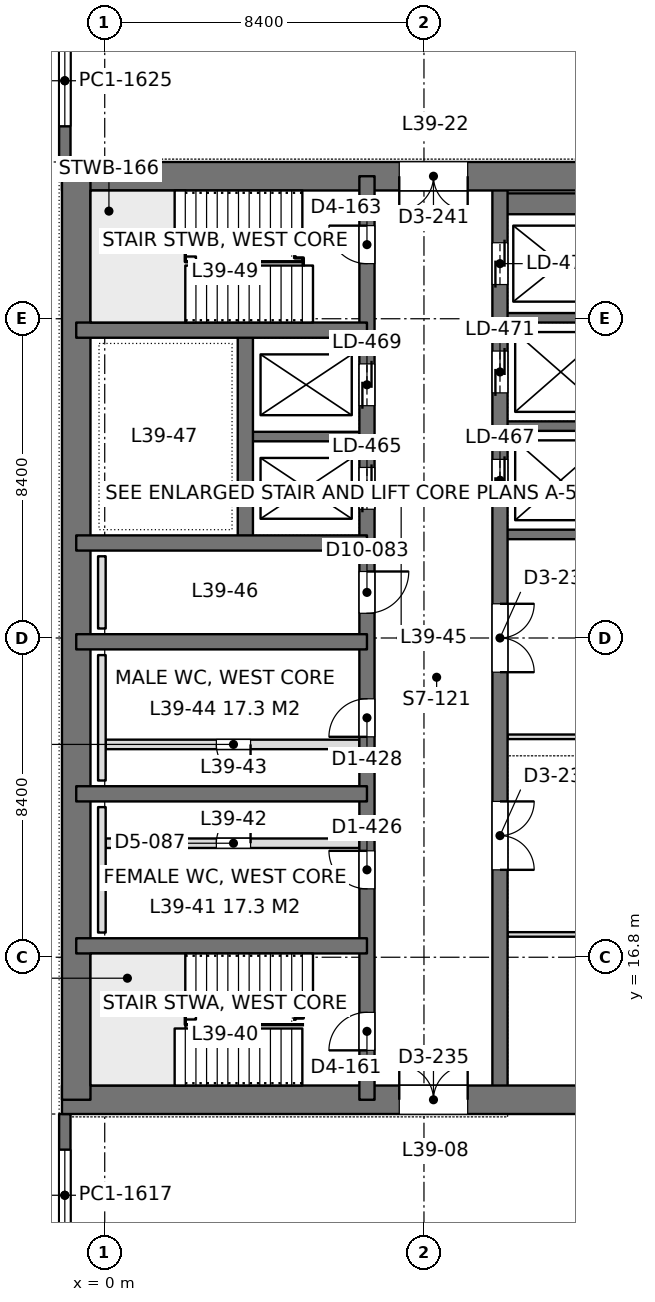
"""IFC4 building model, lengths in metres.
Left out: names, types, materials, properties, quantities, classifications, styles, units other than length and angle.
Written with IfcOpenShell. Run it as: python <this file> out.ifc"""

import sys

from ifc_helpers import new_model, si_unit, direction, frame, frame_2d, origin, place, context, subcontext, project, spatial, rectangle, extrude, element, fill, save


model = new_model("IFC4")
c1 = context("Model", 3, precision=1e-05, world=origin(), true_north=direction((0.0, 1.0)))
c2 = subcontext(c1, "Body", "Model", "MODEL_VIEW")
j1 = project(units=[si_unit("LENGTHUNIT", "METRE"), si_unit("PLANEANGLEUNIT", "RADIAN")], contexts=[c1])
p1 = place(None, origin())
s1 = spatial("IfcSite", under=j1, at=p1, CompositionType="ELEMENT")
p2 = place(p1, origin())
s2 = spatial("IfcBuilding", under=s1, at=p2, CompositionType="ELEMENT")
p3 = place(p2, frame((0.0, 0.0, 173.4)))
s3 = spatial("IfcBuildingStorey", under=s2, at=p3, CompositionType="ELEMENT", Elevation=173.4)
p4 = place(p3, frame((-1.125, 13.05, 0.0), z_axis=(0.0, 0.0, 1.0), x_axis=(1.0, 0.0, 0.0)))
e1 = element("IfcWall", 1, at=p4, inside=s3, PredefinedType="SHEAR", context=c2, shape_type="SweptSolid", body=[
    extrude(rectangle(XDim=17.85, YDim=0.75, at=frame_2d((8.925, 0.0))), origin(), (0.0, 0.0, 1.0), 4.2),
])
p5 = place(p4, frame((8.875, 0.0, 0.0)))
e2 = element("IfcOpeningElement", 2, at=p5, cuts=e1, PredefinedType="OPENING", context=c2, shape_type="SweptSolid", body=[
    extrude(rectangle(XDim=1.8, YDim=2.4, at=frame_2d((0.9, 1.2))), frame((0.0, 0.385, 0.0), z_axis=(0.0, -1.0, 0.0), x_axis=(1.0, 0.0, 0.0)), (0.0, 0.0, 1.0), 0.77),
])
p6 = place(p3, frame((-1.125, 37.35, 0.0), z_axis=(0.0, 0.0, 1.0), x_axis=(1.0, 0.0, 0.0)))
e3 = element("IfcWall", 3, at=p6, inside=s3, PredefinedType="SHEAR", context=c2, shape_type="SweptSolid", body=[
    extrude(rectangle(XDim=17.85, YDim=0.75, at=frame_2d((8.925, 0.0))), origin(), (0.0, 0.0, 1.0), 4.2),
])
p7 = place(p6, frame((8.875, 0.0, 0.0)))
e4 = element("IfcOpeningElement", 4, at=p7, cuts=e3, PredefinedType="OPENING", context=c2, shape_type="SweptSolid", body=[
    extrude(rectangle(XDim=1.8, YDim=2.4, at=frame_2d((0.9, 1.2))), frame((0.0, 0.385, 0.0), z_axis=(0.0, -1.0, 0.0), x_axis=(1.0, 0.0, 0.0)), (0.0, 0.0, 1.0), 0.77),
])
p8 = place(p3, frame((-0.75, 13.05, 0.0), z_axis=(0.0, 0.0, 1.0), x_axis=(0.0, 1.0, 0.0)))
e5 = element("IfcWall", 5, at=p8, inside=s3, PredefinedType="SHEAR", context=c2, shape_type="SweptSolid", body=[
    extrude(rectangle(XDim=24.3, YDim=0.75, at=frame_2d((12.15, 0.0))), origin(), (0.0, 0.0, 1.0), 4.2),
])
p9 = place(p3, frame((6.9, 13.05, 0.0), z_axis=(0.0, 0.0, 1.0), x_axis=(0.0, 1.0, 0.0)))
e6 = element("IfcWall", 6, at=p9, inside=s3, PredefinedType="SHEAR", context=c2, shape_type="SweptSolid", body=[
    extrude(rectangle(XDim=24.3, YDim=0.4, at=frame_2d((12.15, 0.0))), origin(), (0.0, 0.0, 1.0), 4.2),
])
p10 = place(p9, frame((1.3, 0.0, 0.0)))
e7 = element("IfcOpeningElement", 7, at=p10, cuts=e6, PredefinedType="OPENING", context=c2, shape_type="SweptSolid", body=[
    extrude(rectangle(XDim=1.0, YDim=2.2, at=frame_2d((0.5, 1.1))), frame((0.0, 0.21, 0.0), z_axis=(0.0, -1.0, 0.0), x_axis=(1.0, 0.0, 0.0)), (0.0, 0.0, 1.0), 0.42),
])
p11 = place(p9, frame((22.0, 0.0, 0.0)))
e8 = element("IfcOpeningElement", 8, at=p11, cuts=e6, PredefinedType="OPENING", context=c2, shape_type="SweptSolid", body=[
    extrude(rectangle(XDim=1.0, YDim=2.2, at=frame_2d((0.5, 1.1))), frame((0.0, 0.21, 0.0), z_axis=(0.0, -1.0, 0.0), x_axis=(1.0, 0.0, 0.0)), (0.0, 0.0, 1.0), 0.42),
])
p12 = place(p9, frame((5.55, 0.0, 0.0)))
e9 = element("IfcOpeningElement", 9, at=p12, cuts=e6, PredefinedType="OPENING", context=c2, shape_type="SweptSolid", body=[
    extrude(rectangle(XDim=1.0, YDim=2.2, at=frame_2d((0.5, 1.1))), frame((0.0, 0.21, 0.0), z_axis=(0.0, -1.0, 0.0), x_axis=(1.0, 0.0, 0.0)), (0.0, 0.0, 1.0), 0.42),
])
p13 = place(p9, frame((9.55, 0.0, 0.0)))
e10 = element("IfcOpeningElement", 10, at=p13, cuts=e6, PredefinedType="OPENING", context=c2, shape_type="SweptSolid", body=[
    extrude(rectangle(XDim=1.0, YDim=2.2, at=frame_2d((0.5, 1.1))), frame((0.0, 0.21, 0.0), z_axis=(0.0, -1.0, 0.0), x_axis=(1.0, 0.0, 0.0)), (0.0, 0.0, 1.0), 0.42),
])
p14 = place(p9, frame((12.8, 0.0, 0.0)))
e11 = element("IfcOpeningElement", 11, at=p14, cuts=e6, PredefinedType="OPENING", context=c2, shape_type="SweptSolid", body=[
    extrude(rectangle(XDim=1.1, YDim=2.2, at=frame_2d((0.55, 1.1))), frame((0.0, 0.21, 0.0), z_axis=(0.0, -1.0, 0.0), x_axis=(1.0, 0.0, 0.0)), (0.0, 0.0, 1.0), 0.42),
])
p15 = place(p9, frame((15.538, 0.0, 0.0)))
e12 = element("IfcOpeningElement", 12, at=p15, cuts=e6, PredefinedType="OPENING", context=c2, shape_type="SweptSolid", body=[
    extrude(rectangle(XDim=1.1, YDim=2.2, at=frame_2d((0.55, 1.1))), frame((0.0, 0.21, 0.0), z_axis=(0.0, -1.0, 0.0), x_axis=(1.0, 0.0, 0.0)), (0.0, 0.0, 1.0), 0.42),
])
p16 = place(p9, frame((18.262, 0.0, 0.0)))
e13 = element("IfcOpeningElement", 13, at=p16, cuts=e6, PredefinedType="OPENING", context=c2, shape_type="SweptSolid", body=[
    extrude(rectangle(XDim=1.1, YDim=2.2, at=frame_2d((0.55, 1.1))), frame((0.0, 0.21, 0.0), z_axis=(0.0, -1.0, 0.0), x_axis=(1.0, 0.0, 0.0)), (0.0, 0.0, 1.0), 0.42),
])
p17 = place(p3, frame((10.4, 13.05, 0.0), z_axis=(0.0, 0.0, 1.0), x_axis=(0.0, 1.0, 0.0)))
e14 = element("IfcWall", 14, at=p17, inside=s3, PredefinedType="SHEAR", context=c2, shape_type="SweptSolid", body=[
    extrude(rectangle(XDim=24.3, YDim=0.4, at=frame_2d((12.15, 0.0))), origin(), (0.0, 0.0, 1.0), 4.2),
])
p18 = place(p17, frame((15.75, 0.0, 0.0)))
e15 = element("IfcOpeningElement", 15, at=p18, cuts=e14, PredefinedType="OPENING", context=c2, shape_type="SweptSolid", body=[
    extrude(rectangle(XDim=1.1, YDim=2.2, at=frame_2d((0.55, 1.1))), frame((0.0, 0.21, 0.0), z_axis=(0.0, -1.0, 0.0), x_axis=(1.0, 0.0, 0.0)), (0.0, 0.0, 1.0), 0.42),
])
p19 = place(p17, frame((18.6, 0.0, 0.0)))
e16 = element("IfcOpeningElement", 16, at=p19, cuts=e14, PredefinedType="OPENING", context=c2, shape_type="SweptSolid", body=[
    extrude(rectangle(XDim=1.1, YDim=2.2, at=frame_2d((0.55, 1.1))), frame((0.0, 0.21, 0.0), z_axis=(0.0, -1.0, 0.0), x_axis=(1.0, 0.0, 0.0)), (0.0, 0.0, 1.0), 0.42),
])
p20 = place(p17, frame((21.45, 0.0, 0.0)))
e17 = element("IfcOpeningElement", 17, at=p20, cuts=e14, PredefinedType="OPENING", context=c2, shape_type="SweptSolid", body=[
    extrude(rectangle(XDim=1.1, YDim=2.2, at=frame_2d((0.55, 1.1))), frame((0.0, 0.21, 0.0), z_axis=(0.0, -1.0, 0.0), x_axis=(1.0, 0.0, 0.0)), (0.0, 0.0, 1.0), 0.42),
])
p21 = place(p17, frame((6.05, 0.0, 0.0)))
e18 = element("IfcOpeningElement", 18, at=p21, cuts=e14, PredefinedType="OPENING", context=c2, shape_type="SweptSolid", body=[
    extrude(rectangle(XDim=1.8, YDim=2.4, at=frame_2d((0.9, 1.2))), frame((0.0, 0.21, 0.0), z_axis=(0.0, -1.0, 0.0), x_axis=(1.0, 0.0, 0.0)), (0.0, 0.0, 1.0), 0.42),
])
p22 = place(p17, frame((11.25, 0.0, 0.0)))
e19 = element("IfcOpeningElement", 19, at=p22, cuts=e14, PredefinedType="OPENING", context=c2, shape_type="SweptSolid", body=[
    extrude(rectangle(XDim=1.8, YDim=2.4, at=frame_2d((0.9, 1.2))), frame((0.0, 0.21, 0.0), z_axis=(0.0, -1.0, 0.0), x_axis=(1.0, 0.0, 0.0)), (0.0, 0.0, 1.0), 0.42),
])
for number, where, z_axis, x_axis in (
    (20, (-0.75, 17.1, 0.0), (0.0, 0.0, 1.0), (1.0, 0.0, 0.0)),
    (21, (-0.75, 21.1, 0.0), (0.0, 0.0, 1.0), (1.0, 0.0, 0.0)),
    (22, (-0.75, 25.1, 0.0), (0.0, 0.0, 1.0), (1.0, 0.0, 0.0)),
    (23, (-0.75, 27.7, 0.0), (0.0, 0.0, 1.0), (1.0, 0.0, 0.0)),
    (24, (-0.75, 33.3, 0.0), (0.0, 0.0, 1.0), (1.0, 0.0, 0.0)),
):
    element("IfcWall", number, at=place(p3, frame(where, z_axis=z_axis, x_axis=x_axis)), inside=s3, PredefinedType="SHEAR", context=c2, shape_type="SweptSolid", body=[
        extrude(rectangle(XDim=7.65, YDim=0.4, at=frame_2d((3.825, 0.0))), origin(), (0.0, 0.0, 1.0), 4.2),
    ])
p23 = place(p3, frame((3.7, 27.7, 0.0), z_axis=(0.0, 0.0, 1.0), x_axis=(0.0, 1.0, 0.0)))
e25 = element("IfcWall", 25, at=p23, inside=s3, PredefinedType="SHEAR", context=c2, shape_type="SweptSolid", body=[
    extrude(rectangle(XDim=5.6, YDim=0.4, at=frame_2d((2.8, 0.0))), origin(), (0.0, 0.0, 1.0), 4.2),
])
p24 = place(p3, frame((3.7, 30.5, 0.0), z_axis=(0.0, 0.0, 1.0), x_axis=(1.0, 0.0, 0.0)))
e26 = element("IfcWall", 26, at=p24, inside=s3, PredefinedType="SHEAR", context=c2, shape_type="SweptSolid", body=[
    extrude(rectangle(XDim=3.2, YDim=0.25, at=frame_2d((1.6, 0.0))), origin(), (0.0, 0.0, 1.0), 4.2),
])
p25 = place(p3, frame((10.4, 27.925, 0.0), z_axis=(0.0, 0.0, 1.0), x_axis=(1.0, 0.0, 0.0)))
e27 = element("IfcWall", 27, at=p25, inside=s3, PredefinedType="SHEAR", context=c2, shape_type="SweptSolid", body=[
    extrude(rectangle(XDim=5.95, YDim=0.25, at=frame_2d((2.975, 0.0))), origin(), (0.0, 0.0, 1.0), 4.2),
])
for number, where, z_axis, x_axis in (
    (28, (10.4, 30.775, 0.0), (0.0, 0.0, 1.0), (1.0, 0.0, 0.0)),
    (29, (10.4, 33.625, 0.0), (0.0, 0.0, 1.0), (1.0, 0.0, 0.0)),
):
    element("IfcWall", number, at=place(p3, frame(where, z_axis=z_axis, x_axis=x_axis)), inside=s3, PredefinedType="SHEAR", context=c2, shape_type="SweptSolid", body=[
        extrude(rectangle(XDim=3.2, YDim=0.25, at=frame_2d((1.6, 0.0))), origin(), (0.0, 0.0, 1.0), 4.2),
    ])
p26 = place(p3, frame((10.4, 36.625, 0.0), z_axis=(0.0, 0.0, 1.0), x_axis=(1.0, 0.0, 0.0)))
e30 = element("IfcWall", 30, at=p26, inside=s3, PredefinedType="SHEAR", context=c2, shape_type="SweptSolid", body=[
    extrude(rectangle(XDim=3.2, YDim=0.55, at=frame_2d((1.6, 0.0))), origin(), (0.0, 0.0, 1.0), 4.2),
])
p27 = place(p3, frame((-1.05, 8.4, 0.0), z_axis=(0.0, 0.0, 1.0), x_axis=(0.0, 1.0, 0.0)))
e31 = element("IfcWall", 31, at=p27, inside=s3, PredefinedType="SOLIDWALL", context=c2, shape_type="SweptSolid", body=[
    extrude(rectangle(XDim=4.275, YDim=0.3, at=frame_2d((2.138, 0.0))), origin(), (0.0, 0.0, 1.0), 4.05),
])
p28 = place(p27, frame((0.938, 0.0, 0.9)))
e32 = element("IfcOpeningElement", 32, at=p28, cuts=e31, PredefinedType="OPENING", context=c2, shape_type="SweptSolid", body=[
    extrude(rectangle(XDim=2.4, YDim=1.9, at=frame_2d((1.2, 0.95))), frame((0.0, 0.16, 0.0), z_axis=(0.0, -1.0, 0.0), x_axis=(1.0, 0.0, 0.0)), (0.0, 0.0, 1.0), 0.32),
])
p29 = place(p3, frame((-1.05, 37.725, 0.0), z_axis=(0.0, 0.0, 1.0), x_axis=(0.0, 1.0, 0.0)))
e33 = element("IfcWall", 33, at=p29, inside=s3, PredefinedType="SOLIDWALL", context=c2, shape_type="SweptSolid", body=[
    extrude(rectangle(XDim=4.275, YDim=0.3, at=frame_2d((2.137, 0.0))), origin(), (0.0, 0.0, 1.0), 4.05),
])
p30 = place(p29, frame((0.938, 0.0, 0.9)))
e34 = element("IfcOpeningElement", 34, at=p30, cuts=e33, PredefinedType="OPENING", context=c2, shape_type="SweptSolid", body=[
    extrude(rectangle(XDim=2.4, YDim=1.9, at=frame_2d((1.2, 0.95))), frame((0.0, 0.16, 0.0), z_axis=(0.0, -1.0, 0.0), x_axis=(1.0, 0.0, 0.0)), (0.0, 0.0, 1.0), 0.32),
])
p31 = place(p3, frame((10.598, 17.4, 0.0), z_axis=(0.0, 0.0, 1.0), x_axis=(1.0, 0.0, 0.0)))
e35 = element("IfcWall", 35, at=p31, inside=s3, PredefinedType="PARTITIONING", context=c2, shape_type="SweptSolid", body=[
    extrude(rectangle(XDim=5.904, YDim=0.12, at=frame_2d((2.952, 0.0))), origin(), (0.0, 0.0, 1.0), 3.55),
])
p32 = place(p3, frame((10.598, 22.6, 0.0), z_axis=(0.0, 0.0, 1.0), x_axis=(1.0, 0.0, 0.0)))
e36 = element("IfcWall", 36, at=p32, inside=s3, PredefinedType="PARTITIONING", context=c2, shape_type="SweptSolid", body=[
    extrude(rectangle(XDim=5.053, YDim=0.12, at=frame_2d((2.526, 0.0))), origin(), (0.0, 0.0, 1.0), 4.05),
])
p33 = place(p3, frame((0.025, 22.4, 0.0), z_axis=(0.0, 0.0, 1.0), x_axis=(1.0, 0.0, 0.0)))
e37 = element("IfcWall", 37, at=p33, inside=s3, PredefinedType="PARTITIONING", context=c2, shape_type="SweptSolid", body=[
    extrude(rectangle(XDim=6.675, YDim=0.25, at=frame_2d((3.337, 0.0))), origin(), (0.0, 0.0, 1.0), 4.0),
])
p34 = place(p33, frame((2.913, 0.0, 0.0)))
e38 = element("IfcOpeningElement", 38, at=p34, cuts=e37, PredefinedType="OPENING", context=c2, shape_type="SweptSolid", body=[
    extrude(rectangle(XDim=0.9, YDim=2.2, at=frame_2d((0.45, 1.1))), frame((0.0, 0.135, 0.0), z_axis=(0.0, -1.0, 0.0), x_axis=(1.0, 0.0, 0.0)), (0.0, 0.0, 1.0), 0.27),
])
p35 = place(p3, frame((0.025, 19.8, 0.0), z_axis=(0.0, 0.0, 1.0), x_axis=(1.0, 0.0, 0.0)))
e39 = element("IfcWall", 39, at=p35, inside=s3, PredefinedType="PARTITIONING", context=c2, shape_type="SweptSolid", body=[
    extrude(rectangle(XDim=6.675, YDim=0.25, at=frame_2d((3.337, 0.0))), origin(), (0.0, 0.0, 1.0), 4.0),
])
p36 = place(p35, frame((2.913, 0.0, 0.0)))
e40 = element("IfcOpeningElement", 40, at=p36, cuts=e39, PredefinedType="OPENING", context=c2, shape_type="SweptSolid", body=[
    extrude(rectangle(XDim=0.9, YDim=2.2, at=frame_2d((0.45, 1.1))), frame((0.0, 0.135, 0.0), z_axis=(0.0, -1.0, 0.0), x_axis=(1.0, 0.0, 0.0)), (0.0, 0.0, 1.0), 0.27),
])
for number, where, z_axis, x_axis in (
    (41, (-0.075, 17.45, 0.0), (0.0, 0.0, 1.0), (0.0, 1.0, 0.0)),
    (42, (-0.075, 21.45, 0.0), (0.0, 0.0, 1.0), (0.0, 1.0, 0.0)),
):
    element("IfcWall", number, at=place(p3, frame(where, z_axis=z_axis, x_axis=x_axis)), inside=s3, PredefinedType="PLUMBINGWALL", context=c2, shape_type="SweptSolid", body=[
        extrude(rectangle(XDim=3.3, YDim=0.2, at=frame_2d((1.65, 0.0))), origin(), (0.0, 0.0, 1.0), 1.2),
    ])
p37 = place(p3, frame((-0.075, 25.45, 0.0), z_axis=(0.0, 0.0, 1.0), x_axis=(0.0, 1.0, 0.0)))
e43 = element("IfcWall", 43, at=p37, inside=s3, PredefinedType="PLUMBINGWALL", context=c2, shape_type="SweptSolid", body=[
    extrude(rectangle(XDim=1.9, YDim=0.2, at=frame_2d((0.95, 0.0))), origin(), (0.0, 0.0, 1.0), 1.2),
])
p38 = place(p28, origin())
e44 = element("IfcWindow", 44, at=p38, inside=s3, PartitioningType="SINGLE_PANEL", PredefinedType="WINDOW", context=c2, shape_type="SweptSolid", body=[
    extrude(rectangle(XDim=2.4, YDim=1.9, at=frame_2d((1.2, 0.95))), frame((0.0, 0.03, 0.0), z_axis=(0.0, -1.0, 0.0), x_axis=(1.0, 0.0, 0.0)), (0.0, 0.0, 1.0), 0.06),
])
fill(e32, e44)
p39 = place(p30, origin())
e45 = element("IfcWindow", 45, at=p39, inside=s3, PartitioningType="SINGLE_PANEL", PredefinedType="WINDOW", context=c2, shape_type="SweptSolid", body=[
    extrude(rectangle(XDim=2.4, YDim=1.9, at=frame_2d((1.2, 0.95))), frame((0.0, 0.03, 0.0), z_axis=(0.0, -1.0, 0.0), x_axis=(1.0, 0.0, 0.0)), (0.0, 0.0, 1.0), 0.06),
])
fill(e34, e45)
p40 = place(p5, origin())
e46 = element("IfcDoor", 46, at=p40, inside=s3, OperationType="DOUBLE_DOOR_SINGLE_SWING", PredefinedType="DOOR", context=c2, shape_type="SweptSolid", body=[
    extrude(rectangle(XDim=1.8, YDim=2.4, at=frame_2d((0.9, 1.2))), frame((0.0, 0.025, 0.0), z_axis=(0.0, -1.0, 0.0), x_axis=(1.0, 0.0, 0.0)), (0.0, 0.0, 1.0), 0.05),
])
fill(e2, e46)
p41 = place(p7, frame((1.8, 0.0, 0.0), z_axis=(0.0, 0.0, 1.0), x_axis=(-1.0, 0.0, 0.0)))
e47 = element("IfcDoor", 47, at=p41, inside=s3, OperationType="DOUBLE_DOOR_SINGLE_SWING", PredefinedType="DOOR", context=c2, shape_type="SweptSolid", body=[
    extrude(rectangle(XDim=1.8, YDim=2.4, at=frame_2d((0.9, 1.2))), frame((0.0, 0.025, 0.0), z_axis=(0.0, -1.0, 0.0), x_axis=(1.0, 0.0, 0.0)), (0.0, 0.0, 1.0), 0.05),
])
fill(e4, e47)
p42 = place(p10, origin())
e48 = element("IfcDoor", 48, at=p42, inside=s3, OperationType="SINGLE_SWING_LEFT", PredefinedType="DOOR", context=c2, shape_type="SweptSolid", body=[
    extrude(rectangle(XDim=1.0, YDim=2.2, at=frame_2d((0.5, 1.1))), frame((0.0, 0.025, 0.0), z_axis=(0.0, -1.0, 0.0), x_axis=(1.0, 0.0, 0.0)), (0.0, 0.0, 1.0), 0.05),
])
fill(e7, e48)
p43 = place(p11, origin())
e49 = element("IfcDoor", 49, at=p43, inside=s3, OperationType="SINGLE_SWING_RIGHT", PredefinedType="DOOR", context=c2, shape_type="SweptSolid", body=[
    extrude(rectangle(XDim=1.0, YDim=2.2, at=frame_2d((0.5, 1.1))), frame((0.0, 0.025, 0.0), z_axis=(0.0, -1.0, 0.0), x_axis=(1.0, 0.0, 0.0)), (0.0, 0.0, 1.0), 0.05),
])
fill(e8, e49)
p44 = place(p12, origin())
e50 = element("IfcDoor", 50, at=p44, inside=s3, OperationType="SINGLE_SWING_RIGHT", PredefinedType="DOOR", context=c2, shape_type="SweptSolid", body=[
    extrude(rectangle(XDim=1.0, YDim=2.2, at=frame_2d((0.5, 1.1))), frame((0.0, 0.025, 0.0), z_axis=(0.0, -1.0, 0.0), x_axis=(1.0, 0.0, 0.0)), (0.0, 0.0, 1.0), 0.05),
])
fill(e9, e50)
p45 = place(p13, origin())
e51 = element("IfcDoor", 51, at=p45, inside=s3, OperationType="SINGLE_SWING_LEFT", PredefinedType="DOOR", context=c2, shape_type="SweptSolid", body=[
    extrude(rectangle(XDim=1.0, YDim=2.2, at=frame_2d((0.5, 1.1))), frame((0.0, 0.025, 0.0), z_axis=(0.0, -1.0, 0.0), x_axis=(1.0, 0.0, 0.0)), (0.0, 0.0, 1.0), 0.05),
])
fill(e10, e51)
p46 = place(p14, frame((1.1, 0.0, 0.0), z_axis=(0.0, 0.0, 1.0), x_axis=(-1.0, 0.0, 0.0)))
e52 = element("IfcDoor", 52, at=p46, inside=s3, OperationType="SINGLE_SWING_LEFT", PredefinedType="DOOR", context=c2, shape_type="SweptSolid", body=[
    extrude(rectangle(XDim=1.1, YDim=2.2, at=frame_2d((0.55, 1.1))), frame((0.0, 0.025, 0.0), z_axis=(0.0, -1.0, 0.0), x_axis=(1.0, 0.0, 0.0)), (0.0, 0.0, 1.0), 0.05),
])
fill(e11, e52)
p47 = place(p18, origin())
e53 = element("IfcDoor", 53, at=p47, inside=s3, OperationType="DOUBLE_DOOR_SLIDING", PredefinedType="DOOR", context=c2, shape_type="SweptSolid", body=[
    extrude(rectangle(XDim=1.1, YDim=2.2, at=frame_2d((0.55, 1.1))), frame((0.0, 0.025, 0.0), z_axis=(0.0, -1.0, 0.0), x_axis=(1.0, 0.0, 0.0)), (0.0, 0.0, 1.0), 0.05),
])
fill(e15, e53)
p48 = place(p19, origin())
e54 = element("IfcDoor", 54, at=p48, inside=s3, OperationType="DOUBLE_DOOR_SLIDING", PredefinedType="DOOR", context=c2, shape_type="SweptSolid", body=[
    extrude(rectangle(XDim=1.1, YDim=2.2, at=frame_2d((0.55, 1.1))), frame((0.0, 0.025, 0.0), z_axis=(0.0, -1.0, 0.0), x_axis=(1.0, 0.0, 0.0)), (0.0, 0.0, 1.0), 0.05),
])
fill(e16, e54)
p49 = place(p20, origin())
e55 = element("IfcDoor", 55, at=p49, inside=s3, OperationType="DOUBLE_DOOR_SLIDING", PredefinedType="DOOR", context=c2, shape_type="SweptSolid", body=[
    extrude(rectangle(XDim=1.1, YDim=2.2, at=frame_2d((0.55, 1.1))), frame((0.0, 0.025, 0.0), z_axis=(0.0, -1.0, 0.0), x_axis=(1.0, 0.0, 0.0)), (0.0, 0.0, 1.0), 0.05),
])
fill(e17, e55)
p50 = place(p15, origin())
e56 = element("IfcDoor", 56, at=p50, inside=s3, OperationType="DOUBLE_DOOR_SLIDING", PredefinedType="DOOR", context=c2, shape_type="SweptSolid", body=[
    extrude(rectangle(XDim=1.1, YDim=2.2, at=frame_2d((0.55, 1.1))), frame((0.0, 0.025, 0.0), z_axis=(0.0, -1.0, 0.0), x_axis=(1.0, 0.0, 0.0)), (0.0, 0.0, 1.0), 0.05),
])
fill(e12, e56)
p51 = place(p16, origin())
e57 = element("IfcDoor", 57, at=p51, inside=s3, OperationType="DOUBLE_DOOR_SLIDING", PredefinedType="DOOR", context=c2, shape_type="SweptSolid", body=[
    extrude(rectangle(XDim=1.1, YDim=2.2, at=frame_2d((0.55, 1.1))), frame((0.0, 0.025, 0.0), z_axis=(0.0, -1.0, 0.0), x_axis=(1.0, 0.0, 0.0)), (0.0, 0.0, 1.0), 0.05),
])
fill(e13, e57)
p52 = place(p21, frame((1.8, 0.0, 0.0), z_axis=(0.0, 0.0, 1.0), x_axis=(-1.0, 0.0, 0.0)))
e58 = element("IfcDoor", 58, at=p52, inside=s3, OperationType="DOUBLE_DOOR_SINGLE_SWING", PredefinedType="DOOR", context=c2, shape_type="SweptSolid", body=[
    extrude(rectangle(XDim=1.8, YDim=2.4, at=frame_2d((0.9, 1.2))), frame((0.0, 0.025, 0.0), z_axis=(0.0, -1.0, 0.0), x_axis=(1.0, 0.0, 0.0)), (0.0, 0.0, 1.0), 0.05),
])
fill(e18, e58)
p53 = place(p22, frame((1.8, 0.0, 0.0), z_axis=(0.0, 0.0, 1.0), x_axis=(-1.0, 0.0, 0.0)))
e59 = element("IfcDoor", 59, at=p53, inside=s3, OperationType="DOUBLE_DOOR_SINGLE_SWING", PredefinedType="DOOR", context=c2, shape_type="SweptSolid", body=[
    extrude(rectangle(XDim=1.8, YDim=2.4, at=frame_2d((0.9, 1.2))), frame((0.0, 0.025, 0.0), z_axis=(0.0, -1.0, 0.0), x_axis=(1.0, 0.0, 0.0)), (0.0, 0.0, 1.0), 0.05),
])
fill(e19, e59)
p54 = place(p34, frame((0.9, 0.0, 0.0), z_axis=(0.0, 0.0, 1.0), x_axis=(-1.0, 0.0, 0.0)))
e60 = element("IfcDoor", 60, at=p54, inside=s3, OperationType="SINGLE_SWING_LEFT", PredefinedType="DOOR", context=c2, shape_type="SweptSolid", body=[
    extrude(rectangle(XDim=0.9, YDim=2.2, at=frame_2d((0.45, 1.1))), frame((0.0, 0.025, 0.0), z_axis=(0.0, -1.0, 0.0), x_axis=(1.0, 0.0, 0.0)), (0.0, 0.0, 1.0), 0.05),
])
fill(e38, e60)
p55 = place(p36, origin())
e61 = element("IfcDoor", 61, at=p55, inside=s3, OperationType="SINGLE_SWING_RIGHT", PredefinedType="DOOR", context=c2, shape_type="SweptSolid", body=[
    extrude(rectangle(XDim=0.9, YDim=2.2, at=frame_2d((0.45, 1.1))), frame((0.0, 0.025, 0.0), z_axis=(0.0, -1.0, 0.0), x_axis=(1.0, 0.0, 0.0)), (0.0, 0.0, 1.0), 0.05),
])
fill(e40, e61)
save(model, sys.argv[1])
